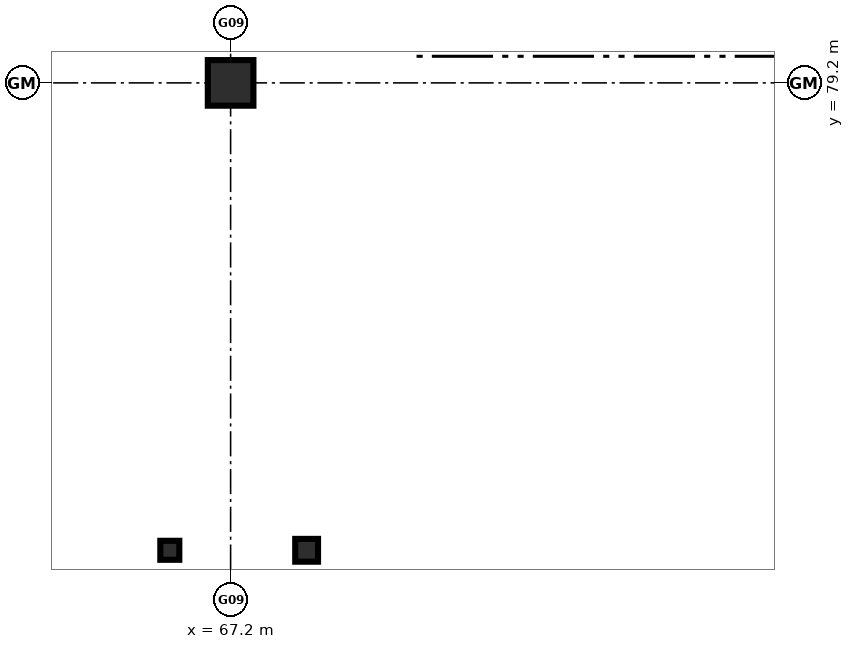
"""IFC4 building model, lengths in metres.
Left out: names, types, materials, properties, quantities, classifications, styles, units other than length and angle.
Written with IfcOpenShell. Run it as: python <this file> out.ifc"""

import sys

from ifc_helpers import new_model, si_unit, direction, frame, origin, origin_2d, place, context, subcontext, project, spatial, rectangle, hollow_rectangle, i_section, extrude, element, save


model = new_model("IFC4")
c1 = context("Model", 3, precision=1e-05, world=origin(), true_north=direction((0.0, 1.0)))
c2 = subcontext(c1, "Body", "Model", "MODEL_VIEW")
j1 = project(units=[si_unit("LENGTHUNIT", "METRE"), si_unit("PLANEANGLEUNIT", "RADIAN")], contexts=[c1])
p1 = place(None, origin())
s1 = spatial("IfcSite", under=j1, at=p1, CompositionType="ELEMENT")
p2 = place(p1, origin())
s2 = spatial("IfcBuilding", under=s1, at=p2, CompositionType="ELEMENT")
p3 = place(p2, frame((0.0, 0.0, -4.8)))
s3 = spatial("IfcBuildingStorey", under=s2, at=p3, CompositionType="ELEMENT", Elevation=-4.8)
p4 = place(p3, frame((67.2, 79.2, 0.0), z_axis=(0.0, 0.0, 1.0), x_axis=(1.0, 0.0, 0.0)))
e1 = element("IfcColumn", 1, at=p4, inside=s3, PredefinedType="COLUMN", context=c2, shape_type="SweptSolid", body=[
    extrude(rectangle(XDim=0.6, YDim=0.6, at=origin_2d()), origin(), (0.0, 0.0, 1.0), 4.8),
])
p5 = place(p3, frame((68.2, 73.05, 0.0), z_axis=(0.0, 0.0, 1.0), x_axis=(1.0, 0.0, 0.0)))
e2 = element("IfcColumn", 2, at=p5, inside=s3, PredefinedType="COLUMN", context=c2, shape_type="SweptSolid", body=[
    extrude(i_section(OverallWidth=0.3, OverallDepth=0.3, WebThickness=0.011, FlangeThickness=0.019, FilletRadius=0.027, at=origin_2d()), origin(), (0.0, 0.0, 1.0), 4.8),
])
p6 = place(p3, frame((66.4, 73.05, 0.0), z_axis=(0.0, 0.0, 1.0), x_axis=(1.0, 0.0, 0.0)))
e3 = element("IfcColumn", 3, at=p6, inside=s3, PredefinedType="COLUMN", context=c2, shape_type="SweptSolid", body=[
    extrude(hollow_rectangle(XDim=0.25, YDim=0.25, WallThickness=0.01, at=origin_2d()), origin(), (0.0, 0.0, 1.0), 4.8),
])
save(model, sys.argv[1])
